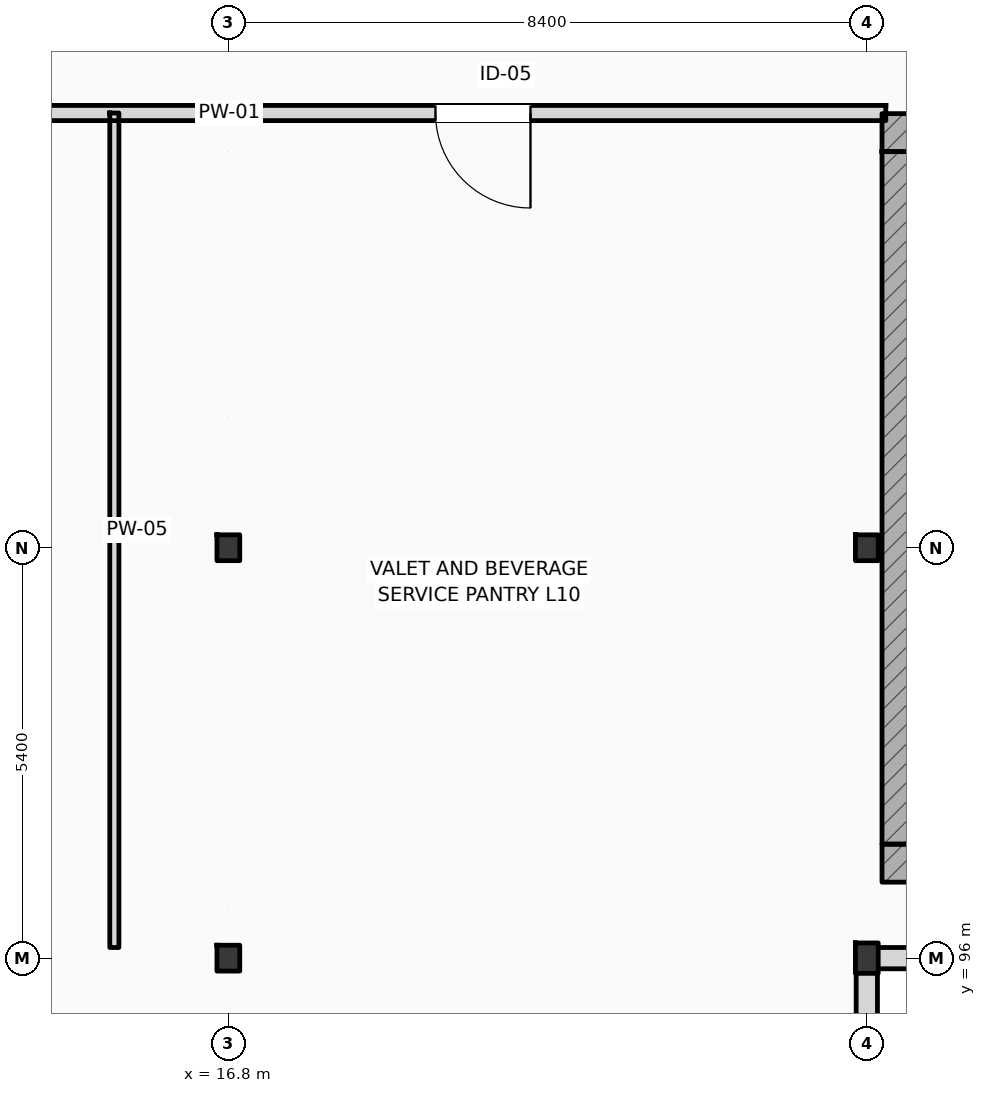
"""IFC4 building model, lengths in metres.
Left out: names, types, materials, properties, quantities, classifications, styles, units other than length and angle.
Written with IfcOpenShell. Run it as: python <this file> out.ifc"""

import sys

from ifc_helpers import new_model, si_unit, direction, frame, frame_2d, origin, origin_2d, place, context, subcontext, project, spatial, rectangle, i_section, extrude, element, fill, save


model = new_model("IFC4")
c1 = context("Model", 3, precision=1e-05, world=origin(), true_north=direction((0.0, 1.0)))
c2 = subcontext(c1, "Body", "Model", "MODEL_VIEW")
j1 = project(units=[si_unit("LENGTHUNIT", "METRE"), si_unit("PLANEANGLEUNIT", "RADIAN")], contexts=[c1])
p1 = place(None, origin())
s1 = spatial("IfcSite", under=j1, at=p1, CompositionType="ELEMENT")
p2 = place(p1, origin())
s2 = spatial("IfcBuilding", under=s1, at=p2, CompositionType="ELEMENT")
p3 = place(p2, frame((0.0, 0.0, 42.6)))
s3 = spatial("IfcBuildingStorey", under=s2, at=p3, CompositionType="ELEMENT", Elevation=42.6)
p4 = place(p3, frame((16.8, 96.0, 0.0), z_axis=(0.0, 0.0, 1.0), x_axis=(1.0, 0.0, 0.0)))
e1 = element("IfcColumn", 1, at=p4, inside=s3, PredefinedType="COLUMN", context=c2, shape_type="SweptSolid", body=[
    extrude(i_section(OverallWidth=0.3, OverallDepth=0.34, WebThickness=0.012, FlangeThickness=0.021, FilletRadius=0.027, at=origin_2d()), origin(), (0.0, 0.0, 1.0), 4.2),
])
p5 = place(p3, frame((25.2, 96.0, 0.0), z_axis=(0.0, 0.0, 1.0), x_axis=(1.0, 0.0, 0.0)))
e2 = element("IfcColumn", 2, at=p5, inside=s3, PredefinedType="COLUMN", context=c2, shape_type="SweptSolid", body=[
    extrude(i_section(OverallWidth=0.3, OverallDepth=0.4, WebThickness=0.013, FlangeThickness=0.024, FilletRadius=0.027, at=origin_2d()), origin(), (0.0, 0.0, 1.0), 4.2),
])
for number, where, z_axis, x_axis in (
    (3, (16.8, 101.4, 0.0), (0.0, 0.0, 1.0), (1.0, 0.0, 0.0)),
    (4, (25.2, 101.4, 0.0), (0.0, 0.0, 1.0), (1.0, 0.0, 0.0)),
):
    element("IfcColumn", number, at=place(p3, frame(where, z_axis=z_axis, x_axis=x_axis)), inside=s3, PredefinedType="COLUMN", context=c2, shape_type="SweptSolid", body=[
        extrude(i_section(OverallWidth=0.3, OverallDepth=0.34, WebThickness=0.012, FlangeThickness=0.021, FilletRadius=0.027, at=origin_2d()), origin(), (0.0, 0.0, 1.0), 4.2),
    ])
for number, where, z_axis, x_axis in (
    (5, (25.4, 106.862, 0.0), (0.0, 0.0, 1.0), (1.0, 0.0, 0.0)),
    (6, (25.4, 97.25, 0.0), (0.0, 0.0, 1.0), (1.0, 0.0, 0.0)),
):
    element("IfcWall", number, at=place(p3, frame(where, z_axis=z_axis, x_axis=x_axis)), inside=s3, PredefinedType="SHEAR", context=c2, shape_type="SweptSolid", body=[
        extrude(rectangle(XDim=5.16, YDim=0.5, at=frame_2d((2.58, 0.0))), origin(), (0.0, 0.0, 1.0), 4.2),
    ])
p6 = place(p3, frame((25.65, 97.5, 0.0), z_axis=(0.0, 0.0, 1.0), x_axis=(0.0, 1.0, 0.0)))
e7 = element("IfcWall", 7, at=p6, inside=s3, PredefinedType="SHEAR", context=c2, shape_type="SweptSolid", body=[
    extrude(rectangle(XDim=9.112, YDim=0.5, at=frame_2d((4.556, 0.0))), origin(), (0.0, 0.0, 1.0), 4.2),
])
p7 = place(p3, frame((25.2, 96.0, 0.0), z_axis=(0.0, 0.0, 1.0), x_axis=(1.0, 0.0, 0.0)))
e8 = element("IfcWall", 8, at=p7, inside=s3, PredefinedType="STANDARD", context=c2, shape_type="SweptSolid", body=[
    extrude(rectangle(XDim=70.2, YDim=0.28, at=frame_2d((35.1, 0.0))), origin(), (0.0, 0.0, 1.0), 3.42),
])
p8 = place(p7, frame((16.83, 0.0, 0.9)))
e9 = element("IfcOpeningElement", 9, at=p8, cuts=e8, PredefinedType="OPENING", context=c2, shape_type="SweptSolid", body=[
    extrude(rectangle(XDim=2.25, YDim=2.15, at=frame_2d((1.125, 1.075))), frame((0.0, 0.15, 0.0), z_axis=(0.0, -1.0, 0.0), x_axis=(1.0, 0.0, 0.0)), (0.0, 0.0, 1.0), 0.3),
])
p9 = place(p7, frame((20.815, 0.0, 0.9)))
e10 = element("IfcOpeningElement", 10, at=p9, cuts=e8, PredefinedType="OPENING", context=c2, shape_type="SweptSolid", body=[
    extrude(rectangle(XDim=1.8, YDim=2.2, at=frame_2d((0.9, 1.1))), frame((0.0, 0.15, 0.0), z_axis=(0.0, -1.0, 0.0), x_axis=(1.0, 0.0, 0.0)), (0.0, 0.0, 1.0), 0.3),
])
p10 = place(p7, frame((26.03, 0.0, 0.9)))
e11 = element("IfcOpeningElement", 11, at=p10, cuts=e8, PredefinedType="OPENING", context=c2, shape_type="SweptSolid", body=[
    extrude(rectangle(XDim=2.55, YDim=2.25, at=frame_2d((1.275, 1.125))), frame((0.0, 0.15, 0.0), z_axis=(0.0, -1.0, 0.0), x_axis=(1.0, 0.0, 0.0)), (0.0, 0.0, 1.0), 0.3),
])
p11 = place(p7, frame((32.045, 0.0, 0.9)))
e12 = element("IfcOpeningElement", 12, at=p11, cuts=e8, PredefinedType="OPENING", context=c2, shape_type="SweptSolid", body=[
    extrude(rectangle(XDim=1.35, YDim=2.3, at=frame_2d((0.675, 1.15))), frame((0.0, 0.15, 0.0), z_axis=(0.0, -1.0, 0.0), x_axis=(1.0, 0.0, 0.0)), (0.0, 0.0, 1.0), 0.3),
])
p12 = place(p7, frame((35.2, 0.0, 0.9)))
e13 = element("IfcOpeningElement", 13, at=p12, cuts=e8, PredefinedType="OPENING", context=c2, shape_type="SweptSolid", body=[
    extrude(rectangle(XDim=2.85, YDim=2.34, at=frame_2d((1.425, 1.17))), frame((0.0, 0.15, 0.0), z_axis=(0.0, -1.0, 0.0), x_axis=(1.0, 0.0, 0.0)), (0.0, 0.0, 1.0), 0.3),
])
p13 = place(p7, frame((55.544, 0.0, 0.9)))
e14 = element("IfcOpeningElement", 14, at=p13, cuts=e8, PredefinedType="OPENING", context=c2, shape_type="SweptSolid", body=[
    extrude(rectangle(XDim=3.0, YDim=2.34, at=frame_2d((1.5, 1.17))), frame((0.0, 0.15, 0.0), z_axis=(0.0, -1.0, 0.0), x_axis=(1.0, 0.0, 0.0)), (0.0, 0.0, 1.0), 0.3),
])
p14 = place(p7, frame((60.151, 0.0, 0.9)))
e15 = element("IfcOpeningElement", 15, at=p14, cuts=e8, PredefinedType="OPENING", context=c2, shape_type="SweptSolid", body=[
    extrude(rectangle(XDim=1.35, YDim=2.34, at=frame_2d((0.675, 1.17))), frame((0.0, 0.15, 0.0), z_axis=(0.0, -1.0, 0.0), x_axis=(1.0, 0.0, 0.0)), (0.0, 0.0, 1.0), 0.3),
])
p15 = place(p7, frame((65.582, 0.0, 0.9)))
e16 = element("IfcOpeningElement", 16, at=p15, cuts=e8, PredefinedType="OPENING", context=c2, shape_type="SweptSolid", body=[
    extrude(rectangle(XDim=3.4, YDim=2.34, at=frame_2d((1.7, 1.17))), frame((0.0, 0.15, 0.0), z_axis=(0.0, -1.0, 0.0), x_axis=(1.0, 0.0, 0.0)), (0.0, 0.0, 1.0), 0.3),
])
p16 = place(p3, frame((25.2, 79.5, 0.0), z_axis=(0.0, 0.0, 1.0), x_axis=(0.0, 1.0, 0.0)))
e17 = element("IfcWall", 17, at=p16, inside=s3, PredefinedType="STANDARD", context=c2, shape_type="SweptSolid", body=[
    extrude(rectangle(XDim=16.5, YDim=0.28, at=frame_2d((8.25, 0.0))), origin(), (0.0, 0.0, 1.0), 3.57),
])
p17 = place(p3, frame((10.65, 107.12, 0.0), z_axis=(0.0, 0.0, 1.0), x_axis=(1.0, 0.0, 0.0)))
e18 = element("IfcWall", 18, at=p17, inside=s3, PredefinedType="PARTITIONING", context=c2, shape_type="SweptSolid", body=[
    extrude(rectangle(XDim=14.8, YDim=0.2, at=frame_2d((7.4, 0.0))), origin(), (0.0, 0.0, 1.0), 3.94),
])
p18 = place(p17, frame((1.95, 0.0, 0.0)))
e19 = element("IfcOpeningElement", 19, at=p18, cuts=e18, PredefinedType="OPENING", context=c2, shape_type="SweptSolid", body=[
    extrude(rectangle(XDim=0.9, YDim=2.1, at=frame_2d((0.45, 1.05))), frame((0.0, 0.11, 0.0), z_axis=(0.0, -1.0, 0.0), x_axis=(1.0, 0.0, 0.0)), (0.0, 0.0, 1.0), 0.22),
])
p19 = place(p17, frame((8.875, 0.0, 0.0)))
e20 = element("IfcOpeningElement", 20, at=p19, cuts=e18, PredefinedType="OPENING", context=c2, shape_type="SweptSolid", body=[
    extrude(rectangle(XDim=1.25, YDim=2.15, at=frame_2d((0.625, 1.075))), frame((0.0, 0.11, 0.0), z_axis=(0.0, -1.0, 0.0), x_axis=(1.0, 0.0, 0.0)), (0.0, 0.0, 1.0), 0.22),
])
p20 = place(p3, frame((15.3, 96.14, 0.0), z_axis=(0.0, 0.0, 1.0), x_axis=(0.0, 1.0, 0.0)))
e21 = element("IfcWall", 21, at=p20, inside=s3, PredefinedType="PARTITIONING", context=c2, shape_type="SweptSolid", body=[
    extrude(rectangle(XDim=10.98, YDim=0.12, at=frame_2d((5.49, 0.0))), origin(), (0.0, 0.0, 1.0), 3.94),
])
p21 = place(p19, frame((1.25, 0.0, 0.0), z_axis=(0.0, 0.0, 1.0), x_axis=(-1.0, 0.0, 0.0)))
e22 = element("IfcDoor", 22, at=p21, inside=s3, OperationType="SINGLE_SWING_RIGHT", PredefinedType="DOOR", context=c2, shape_type="SweptSolid", body=[
    extrude(rectangle(XDim=1.25, YDim=2.15, at=frame_2d((0.625, 1.075))), frame((0.0, 0.025, 0.0), z_axis=(0.0, -1.0, 0.0), x_axis=(1.0, 0.0, 0.0)), (0.0, 0.0, 1.0), 0.05),
])
fill(e20, e22)
save(model, sys.argv[1])
